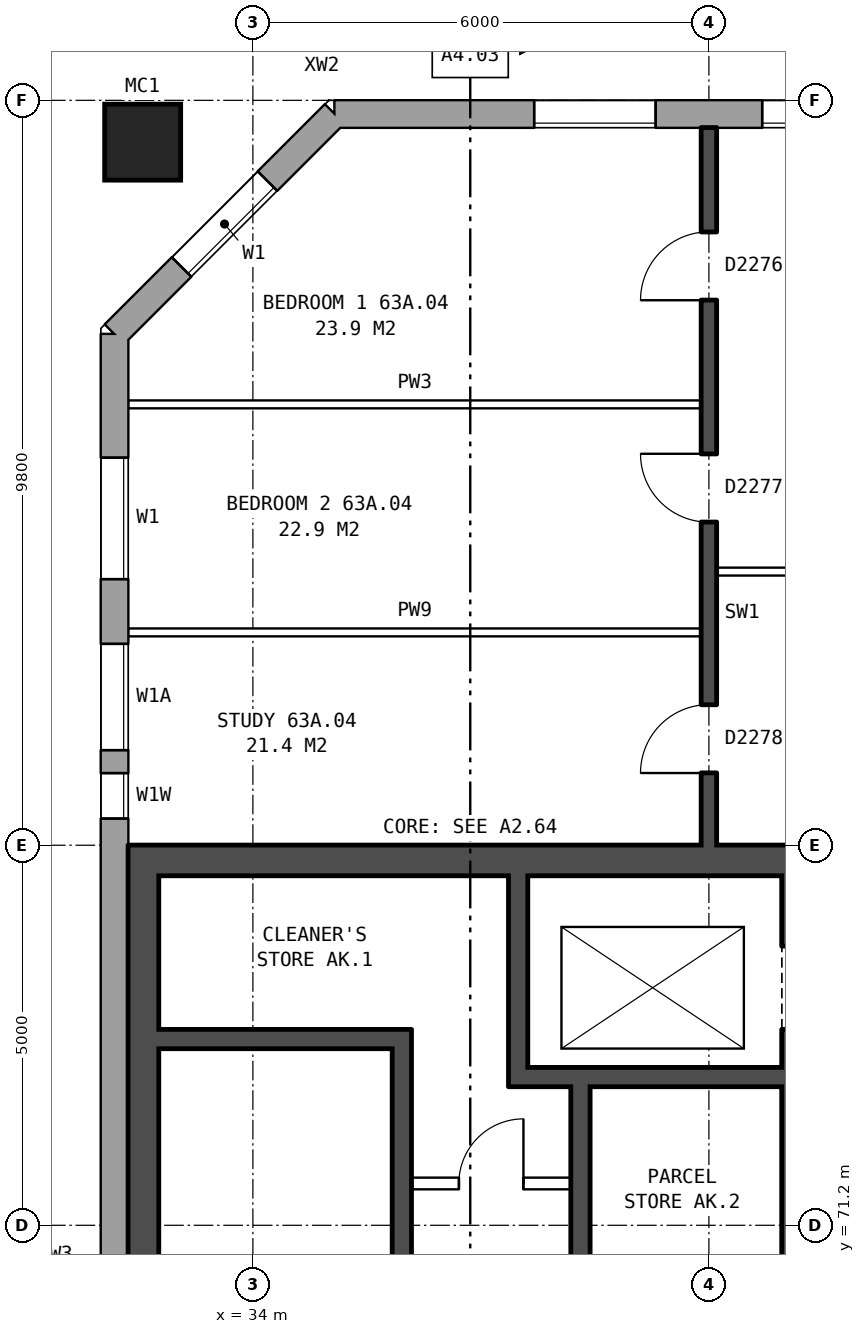
"""IFC4 building model, lengths in metres.
Left out: names, types, materials, properties, quantities, classifications, styles, units other than length and angle.
Written with IfcOpenShell. Run it as: python <this file> out.ifc"""

import sys

from ifc_helpers import new_model, si_unit, direction, frame, frame_2d, origin, origin_2d, place, context, subcontext, project, spatial, rectangle, hollow_rectangle, extrude, element, fill, save


model = new_model("IFC4")
c1 = context("Model", 3, precision=1e-05, world=origin(), true_north=direction((0.0, 1.0)))
c2 = subcontext(c1, "Body", "Model", "MODEL_VIEW")
j1 = project(units=[si_unit("LENGTHUNIT", "METRE"), si_unit("PLANEANGLEUNIT", "RADIAN")], contexts=[c1])
p1 = place(None, origin())
s1 = spatial("IfcSite", under=j1, at=p1, CompositionType="ELEMENT")
p2 = place(p1, origin())
s2 = spatial("IfcBuilding", under=s1, at=p2, CompositionType="ELEMENT")
p3 = place(p2, frame((0.0, 0.0, 224.5)))
s3 = spatial("IfcBuildingStorey", under=s2, at=p3, CompositionType="ELEMENT", Elevation=224.5)
p4 = place(p3, frame((32.55, 85.45, 0.0), z_axis=(0.0, 0.0, 1.0), x_axis=(1.0, 0.0, 0.0)))
e1 = element("IfcColumn", 1, at=p4, inside=s3, PredefinedType="COLUMN", context=c2, shape_type="SweptSolid", body=[
    extrude(hollow_rectangle(XDim=1.0, YDim=1.0, WallThickness=0.055, at=origin_2d()), origin(), (0.0, 0.0, 1.0), 3.1),
])
p5 = place(p3, frame((74.95, 85.82, 0.0), z_axis=(0.0, 0.0, 1.0), x_axis=(-1.0, 0.0, 0.0)))
e2 = element("IfcWall", 2, at=p5, inside=s3, PredefinedType="STANDARD", context=c2, shape_type="SweptSolid", body=[
    extrude(rectangle(XDim=39.875, YDim=0.36, at=frame_2d((19.938, 0.0))), origin(), (0.0, 0.0, 1.0), 2.85),
])
p6 = place(p5, frame((2.65, 0.0, 0.8)))
e3 = element("IfcOpeningElement", 3, at=p6, cuts=e2, PredefinedType="OPENING", context=c2, shape_type="SweptSolid", body=[
    extrude(rectangle(XDim=1.6, YDim=1.8, at=frame_2d((0.8, 0.9))), frame((0.0, 0.19, 0.0), z_axis=(0.0, -1.0, 0.0), x_axis=(1.0, 0.0, 0.0)), (0.0, 0.0, 1.0), 0.38),
])
p7 = place(p5, frame((5.65, 0.0, 0.8)))
e4 = element("IfcOpeningElement", 4, at=p7, cuts=e2, PredefinedType="OPENING", context=c2, shape_type="SweptSolid", body=[
    extrude(rectangle(XDim=1.6, YDim=1.8, at=frame_2d((0.8, 0.9))), frame((0.0, 0.19, 0.0), z_axis=(0.0, -1.0, 0.0), x_axis=(1.0, 0.0, 0.0)), (0.0, 0.0, 1.0), 0.38),
])
p8 = place(p5, frame((8.65, 0.0, 0.8)))
e5 = element("IfcOpeningElement", 5, at=p8, cuts=e2, PredefinedType="OPENING", context=c2, shape_type="SweptSolid", body=[
    extrude(rectangle(XDim=1.6, YDim=1.8, at=frame_2d((0.8, 0.9))), frame((0.0, 0.19, 0.0), z_axis=(0.0, -1.0, 0.0), x_axis=(1.0, 0.0, 0.0)), (0.0, 0.0, 1.0), 0.38),
])
p9 = place(p5, frame((11.65, 0.0, 0.8)))
e6 = element("IfcOpeningElement", 6, at=p9, cuts=e2, PredefinedType="OPENING", context=c2, shape_type="SweptSolid", body=[
    extrude(rectangle(XDim=1.6, YDim=1.8, at=frame_2d((0.8, 0.9))), frame((0.0, 0.19, 0.0), z_axis=(0.0, -1.0, 0.0), x_axis=(1.0, 0.0, 0.0)), (0.0, 0.0, 1.0), 0.38),
])
p10 = place(p5, frame((15.55, 0.0, 0.8)))
e7 = element("IfcOpeningElement", 7, at=p10, cuts=e2, PredefinedType="OPENING", context=c2, shape_type="SweptSolid", body=[
    extrude(rectangle(XDim=1.2, YDim=1.8, at=frame_2d((0.6, 0.9))), frame((0.0, 0.19, 0.0), z_axis=(0.0, -1.0, 0.0), x_axis=(1.0, 0.0, 0.0)), (0.0, 0.0, 1.0), 0.38),
])
p11 = place(p5, frame((17.65, 0.0, 0.8)))
e8 = element("IfcOpeningElement", 8, at=p11, cuts=e2, PredefinedType="OPENING", context=c2, shape_type="SweptSolid", body=[
    extrude(rectangle(XDim=1.6, YDim=1.8, at=frame_2d((0.8, 0.9))), frame((0.0, 0.19, 0.0), z_axis=(0.0, -1.0, 0.0), x_axis=(1.0, 0.0, 0.0)), (0.0, 0.0, 1.0), 0.38),
])
p12 = place(p5, frame((20.65, 0.0, 0.8)))
e9 = element("IfcOpeningElement", 9, at=p12, cuts=e2, PredefinedType="OPENING", context=c2, shape_type="SweptSolid", body=[
    extrude(rectangle(XDim=1.6, YDim=1.8, at=frame_2d((0.8, 0.9))), frame((0.0, 0.19, 0.0), z_axis=(0.0, -1.0, 0.0), x_axis=(1.0, 0.0, 0.0)), (0.0, 0.0, 1.0), 0.38),
])
p13 = place(p5, frame((23.65, 0.0, 0.8)))
e10 = element("IfcOpeningElement", 10, at=p13, cuts=e2, PredefinedType="OPENING", context=c2, shape_type="SweptSolid", body=[
    extrude(rectangle(XDim=1.6, YDim=1.8, at=frame_2d((0.8, 0.9))), frame((0.0, 0.19, 0.0), z_axis=(0.0, -1.0, 0.0), x_axis=(1.0, 0.0, 0.0)), (0.0, 0.0, 1.0), 0.38),
])
p14 = place(p5, frame((26.1, 0.0, 0.25)))
e11 = element("IfcOpeningElement", 11, at=p14, cuts=e2, PredefinedType="OPENING", context=c2, shape_type="SweptSolid", body=[
    extrude(rectangle(XDim=0.8, YDim=1.5, at=frame_2d((0.4, 0.75))), frame((0.0, 0.19, 0.0), z_axis=(0.0, -1.0, 0.0), x_axis=(1.0, 0.0, 0.0)), (0.0, 0.0, 1.0), 0.38),
])
p15 = place(p5, frame((29.65, 0.0, 0.8)))
e12 = element("IfcOpeningElement", 12, at=p15, cuts=e2, PredefinedType="OPENING", context=c2, shape_type="SweptSolid", body=[
    extrude(rectangle(XDim=1.6, YDim=1.8, at=frame_2d((0.8, 0.9))), frame((0.0, 0.19, 0.0), z_axis=(0.0, -1.0, 0.0), x_axis=(1.0, 0.0, 0.0)), (0.0, 0.0, 1.0), 0.38),
])
p16 = place(p5, frame((32.65, 0.0, 0.8)))
e13 = element("IfcOpeningElement", 13, at=p16, cuts=e2, PredefinedType="OPENING", context=c2, shape_type="SweptSolid", body=[
    extrude(rectangle(XDim=1.6, YDim=1.8, at=frame_2d((0.8, 0.9))), frame((0.0, 0.19, 0.0), z_axis=(0.0, -1.0, 0.0), x_axis=(1.0, 0.0, 0.0)), (0.0, 0.0, 1.0), 0.38),
])
p17 = place(p5, frame((35.65, 0.0, 0.8)))
e14 = element("IfcOpeningElement", 14, at=p17, cuts=e2, PredefinedType="OPENING", context=c2, shape_type="SweptSolid", body=[
    extrude(rectangle(XDim=1.6, YDim=1.8, at=frame_2d((0.8, 0.9))), frame((0.0, 0.19, 0.0), z_axis=(0.0, -1.0, 0.0), x_axis=(1.0, 0.0, 0.0)), (0.0, 0.0, 1.0), 0.38),
])
p18 = place(p5, frame((28.15, 0.0, 1.65)))
e15 = element("IfcOpeningElement", 15, at=p18, cuts=e2, PredefinedType="OPENING", context=c2, shape_type="SweptSolid", body=[
    extrude(rectangle(XDim=0.6, YDim=0.9, at=frame_2d((0.3, 0.45))), frame((0.0, 0.19, 0.0), z_axis=(0.0, -1.0, 0.0), x_axis=(1.0, 0.0, 0.0)), (0.0, 0.0, 1.0), 0.38),
])
p19 = place(p3, frame((35.075, 85.82, 0.0), z_axis=(0.0, 0.0, 1.0), x_axis=(-0.707106781187, -0.707106781187, 0.0)))
e16 = element("IfcWall", 16, at=p19, inside=s3, PredefinedType="STANDARD", context=c2, shape_type="SweptSolid", body=[
    extrude(rectangle(XDim=4.094, YDim=0.36, at=frame_2d((2.047, 0.0))), origin(), (0.0, 0.0, 1.0), 2.85),
])
p20 = place(p19, frame((1.247, 0.0, 0.8)))
e17 = element("IfcOpeningElement", 17, at=p20, cuts=e16, PredefinedType="OPENING", context=c2, shape_type="SweptSolid", body=[
    extrude(rectangle(XDim=1.6, YDim=1.8, at=frame_2d((0.8, 0.9))), frame((0.0, 0.19, 0.0), z_axis=(0.0, -1.0, 0.0), x_axis=(1.0, 0.0, 0.0)), (0.0, 0.0, 1.0), 0.38),
])
p21 = place(p3, frame((32.18, 82.925, 0.0), z_axis=(0.0, 0.0, 1.0), x_axis=(0.0, -1.0, 0.0)))
e18 = element("IfcWall", 18, at=p21, inside=s3, PredefinedType="STANDARD", context=c2, shape_type="SweptSolid", body=[
    extrude(rectangle(XDim=25.851, YDim=0.36, at=frame_2d((12.925, 0.0))), origin(), (0.0, 0.0, 1.0), 2.85),
])
p22 = place(p21, frame((1.625, 0.0, 0.8)))
e19 = element("IfcOpeningElement", 19, at=p22, cuts=e18, PredefinedType="OPENING", context=c2, shape_type="SweptSolid", body=[
    extrude(rectangle(XDim=1.6, YDim=1.8, at=frame_2d((0.8, 0.9))), frame((0.0, 0.19, 0.0), z_axis=(0.0, -1.0, 0.0), x_axis=(1.0, 0.0, 0.0)), (0.0, 0.0, 1.0), 0.38),
])
p23 = place(p21, frame((4.075, 0.0, 0.8)))
e20 = element("IfcOpeningElement", 20, at=p23, cuts=e18, PredefinedType="OPENING", context=c2, shape_type="SweptSolid", body=[
    extrude(rectangle(XDim=1.4, YDim=1.8, at=frame_2d((0.7, 0.9))), frame((0.0, 0.19, 0.0), z_axis=(0.0, -1.0, 0.0), x_axis=(1.0, 0.0, 0.0)), (0.0, 0.0, 1.0), 0.38),
])
p24 = place(p21, frame((19.425, 0.0, 0.8)))
e21 = element("IfcOpeningElement", 21, at=p24, cuts=e18, PredefinedType="OPENING", context=c2, shape_type="SweptSolid", body=[
    extrude(rectangle(XDim=0.6, YDim=0.9, at=frame_2d((0.3, 0.45))), frame((0.0, 0.19, 0.0), z_axis=(0.0, -1.0, 0.0), x_axis=(1.0, 0.0, 0.0)), (0.0, 0.0, 1.0), 0.38),
])
p25 = place(p21, frame((22.625, 0.0, 0.8)))
e22 = element("IfcOpeningElement", 22, at=p25, cuts=e18, PredefinedType="OPENING", context=c2, shape_type="SweptSolid", body=[
    extrude(rectangle(XDim=1.6, YDim=1.8, at=frame_2d((0.8, 0.9))), frame((0.0, 0.19, 0.0), z_axis=(0.0, -1.0, 0.0), x_axis=(1.0, 0.0, 0.0)), (0.0, 0.0, 1.0), 0.38),
])
p26 = place(p21, frame((5.775, 0.0, 0.8)))
e23 = element("IfcOpeningElement", 23, at=p26, cuts=e18, PredefinedType="OPENING", context=c2, shape_type="SweptSolid", body=[
    extrude(rectangle(XDim=0.6, YDim=0.9, at=frame_2d((0.3, 0.45))), frame((0.0, 0.19, 0.0), z_axis=(0.0, -1.0, 0.0), x_axis=(1.0, 0.0, 0.0)), (0.0, 0.0, 1.0), 0.38),
])
p27 = place(p21, frame((20.325, 0.0, 0.8)))
e24 = element("IfcOpeningElement", 24, at=p27, cuts=e18, PredefinedType="OPENING", context=c2, shape_type="SweptSolid", body=[
    extrude(rectangle(XDim=1.4, YDim=1.8, at=frame_2d((0.7, 0.9))), frame((0.0, 0.19, 0.0), z_axis=(0.0, -1.0, 0.0), x_axis=(1.0, 0.0, 0.0)), (0.0, 0.0, 1.0), 0.38),
])
p28 = place(p3, frame((41.16, 76.2, 0.0), z_axis=(0.0, 0.0, 1.0), x_axis=(0.0, -1.0, 0.0)))
e25 = element("IfcWall", 25, at=p28, inside=s3, PredefinedType="SHEAR", context=c2, shape_type="SweptSolid", body=[
    extrude(rectangle(XDim=12.4, YDim=0.4, at=frame_2d((6.2, 0.0))), origin(), (0.0, 0.0, 1.0), 2.85),
])
p29 = place(p28, frame((1.325, 0.0, 0.0)))
e26 = element("IfcOpeningElement", 26, at=p29, cuts=e25, PredefinedType="OPENING", context=c2, shape_type="SweptSolid", body=[
    extrude(rectangle(XDim=1.1, YDim=2.1, at=frame_2d((0.55, 1.05))), frame((0.0, 0.21, 0.0), z_axis=(0.0, -1.0, 0.0), x_axis=(1.0, 0.0, 0.0)), (0.0, 0.0, 1.0), 0.42),
])
p30 = place(p28, frame((5.925, 0.0, 0.0)))
e27 = element("IfcOpeningElement", 27, at=p30, cuts=e25, PredefinedType="OPENING", context=c2, shape_type="SweptSolid", body=[
    extrude(rectangle(XDim=0.85, YDim=2.1, at=frame_2d((0.425, 1.05))), frame((0.0, 0.21, 0.0), z_axis=(0.0, -1.0, 0.0), x_axis=(1.0, 0.0, 0.0)), (0.0, 0.0, 1.0), 0.42),
])
p31 = place(p28, frame((9.9, 0.0, 0.0)))
e28 = element("IfcOpeningElement", 28, at=p31, cuts=e25, PredefinedType="OPENING", context=c2, shape_type="SweptSolid", body=[
    extrude(rectangle(XDim=1.1, YDim=2.1, at=frame_2d((0.55, 1.05))), frame((0.0, 0.21, 0.0), z_axis=(0.0, -1.0, 0.0), x_axis=(1.0, 0.0, 0.0)), (0.0, 0.0, 1.0), 0.42),
])
p32 = place(p3, frame((32.56, 76.2, 0.0), z_axis=(0.0, 0.0, 1.0), x_axis=(0.0, -1.0, 0.0)))
e29 = element("IfcWall", 29, at=p32, inside=s3, PredefinedType="SHEAR", context=c2, shape_type="SweptSolid", body=[
    extrude(rectangle(XDim=12.4, YDim=0.4, at=frame_2d((6.2, 0.0))), origin(), (0.0, 0.0, 1.0), 2.85),
])
p33 = place(p3, frame((40.96, 76.0, 0.0), z_axis=(0.0, 0.0, 1.0), x_axis=(-1.0, 0.0, 0.0)))
e30 = element("IfcWall", 30, at=p33, inside=s3, PredefinedType="SHEAR", context=c2, shape_type="SweptSolid", body=[
    extrude(rectangle(XDim=8.2, YDim=0.4, at=frame_2d((4.1, 0.0))), origin(), (0.0, 0.0, 1.0), 2.85),
])
p34 = place(p3, frame((35.835, 73.65, 0.0), z_axis=(0.0, 0.0, 1.0), x_axis=(-1.0, 0.0, 0.0)))
e31 = element("IfcWall", 31, at=p34, inside=s3, PredefinedType="SHEAR", context=c2, shape_type="SweptSolid", body=[
    extrude(rectangle(XDim=3.075, YDim=0.25, at=frame_2d((1.538, 0.0))), origin(), (0.0, 0.0, 1.0), 2.85),
])
p35 = place(p3, frame((40.96, 73.15, 0.0), z_axis=(0.0, 0.0, 1.0), x_axis=(-1.0, 0.0, 0.0)))
e32 = element("IfcWall", 32, at=p35, inside=s3, PredefinedType="SHEAR", context=c2, shape_type="SweptSolid", body=[
    extrude(rectangle(XDim=3.595, YDim=0.25, at=frame_2d((1.797, 0.0))), origin(), (0.0, 0.0, 1.0), 2.85),
])
p36 = place(p3, frame((38.185, 71.75, 0.0), z_axis=(0.0, 0.0, 1.0), x_axis=(-1.0, 0.0, 0.0)))
e33 = element("IfcWall", 33, at=p36, inside=s3, PredefinedType="PARTITIONING", context=c2, shape_type="SweptSolid", body=[
    extrude(rectangle(XDim=2.1, YDim=0.15, at=frame_2d((1.05, 0.0))), origin(), (0.0, 0.0, 1.0), 2.85),
])
p37 = place(p36, frame((0.625, 0.0, 0.0)))
e34 = element("IfcOpeningElement", 34, at=p37, cuts=e33, PredefinedType="OPENING", context=c2, shape_type="SweptSolid", body=[
    extrude(rectangle(XDim=0.85, YDim=2.1, at=frame_2d((0.425, 1.05))), frame((0.0, 0.085, 0.0), z_axis=(0.0, -1.0, 0.0), x_axis=(1.0, 0.0, 0.0)), (0.0, 0.0, 1.0), 0.17),
])
p38 = place(p3, frame((38.31, 73.025, 0.0), z_axis=(0.0, 0.0, 1.0), x_axis=(0.0, -1.0, 0.0)))
e35 = element("IfcWall", 35, at=p38, inside=s3, PredefinedType="SHEAR", context=c2, shape_type="SweptSolid", body=[
    extrude(rectangle(XDim=6.6, YDim=0.25, at=frame_2d((3.3, 0.0))), origin(), (0.0, 0.0, 1.0), 2.85),
])
p39 = place(p3, frame((37.49, 75.8, 0.0), z_axis=(0.0, 0.0, 1.0), x_axis=(0.0, -1.0, 0.0)))
e36 = element("IfcWall", 36, at=p39, inside=s3, PredefinedType="SHEAR", context=c2, shape_type="SweptSolid", body=[
    extrude(rectangle(XDim=2.525, YDim=0.25, at=frame_2d((1.263, 0.0))), origin(), (0.0, 0.0, 1.0), 2.85),
])
p40 = place(p3, frame((35.96, 73.775, 0.0), z_axis=(0.0, 0.0, 1.0), x_axis=(0.0, -1.0, 0.0)))
e37 = element("IfcWall", 37, at=p40, inside=s3, PredefinedType="SHEAR", context=c2, shape_type="SweptSolid", body=[
    extrude(rectangle(XDim=7.35, YDim=0.25, at=frame_2d((3.675, 0.0))), origin(), (0.0, 0.0, 1.0), 2.85),
])
p41 = place(p3, frame((32.36, 79.0, 0.0), z_axis=(0.0, 0.0, 1.0), x_axis=(1.0, 0.0, 0.0)))
e38 = element("IfcWall", 38, at=p41, inside=s3, PredefinedType="PARTITIONING", context=c2, shape_type="SweptSolid", body=[
    extrude(rectangle(XDim=7.54, YDim=0.1, at=frame_2d((3.77, 0.0))), origin(), (0.0, 0.0, 1.0), 2.85),
])
p42 = place(p3, frame((40.1, 79.8, 0.0), z_axis=(0.0, 0.0, 1.0), x_axis=(1.0, 0.0, 0.0)))
e39 = element("IfcWall", 39, at=p42, inside=s3, PredefinedType="PARTITIONING", context=c2, shape_type="SweptSolid", body=[
    extrude(rectangle(XDim=5.8, YDim=0.1, at=frame_2d((2.9, 0.0))), origin(), (0.0, 0.0, 1.0), 2.85),
])
p43 = place(p42, frame((1.3, 0.0, 0.0)))
e40 = element("IfcOpeningElement", 40, at=p43, cuts=e39, PredefinedType="OPENING", context=c2, shape_type="SweptSolid", body=[
    extrude(rectangle(XDim=0.9, YDim=2.1, at=frame_2d((0.45, 1.05))), frame((0.0, 0.06, 0.0), z_axis=(0.0, -1.0, 0.0), x_axis=(1.0, 0.0, 0.0)), (0.0, 0.0, 1.0), 0.12),
])
p44 = place(p42, frame((4.2, 0.0, 0.0)))
e41 = element("IfcOpeningElement", 41, at=p44, cuts=e39, PredefinedType="OPENING", context=c2, shape_type="SweptSolid", body=[
    extrude(rectangle(XDim=0.9, YDim=2.1, at=frame_2d((0.45, 1.05))), frame((0.0, 0.06, 0.0), z_axis=(0.0, -1.0, 0.0), x_axis=(1.0, 0.0, 0.0)), (0.0, 0.0, 1.0), 0.12),
])
p45 = place(p3, frame((32.36, 82.0, 0.0), z_axis=(0.0, 0.0, 1.0), x_axis=(1.0, 0.0, 0.0)))
e42 = element("IfcWall", 42, at=p45, inside=s3, PredefinedType="PARTITIONING", context=c2, shape_type="SweptSolid", body=[
    extrude(rectangle(XDim=7.54, YDim=0.1, at=frame_2d((3.77, 0.0))), origin(), (0.0, 0.0, 1.0), 2.85),
])
p46 = place(p3, frame((40.0, 76.2, 0.0), z_axis=(0.0, 0.0, 1.0), x_axis=(0.0, 1.0, 0.0)))
e43 = element("IfcWall", 43, at=p46, inside=s3, PredefinedType="SOLIDWALL", context=c2, shape_type="SweptSolid", body=[
    extrude(rectangle(XDim=9.44, YDim=0.2, at=frame_2d((4.72, 0.0))), origin(), (0.0, 0.0, 1.0), 2.85),
])
p47 = place(p46, frame((7.17, 0.0, 0.0)))
e44 = element("IfcOpeningElement", 44, at=p47, cuts=e43, PredefinedType="OPENING", context=c2, shape_type="SweptSolid", body=[
    extrude(rectangle(XDim=0.9, YDim=2.1, at=frame_2d((0.45, 1.05))), frame((0.0, 0.11, 0.0), z_axis=(0.0, -1.0, 0.0), x_axis=(1.0, 0.0, 0.0)), (0.0, 0.0, 1.0), 0.22),
])
p48 = place(p46, frame((4.25, 0.0, 0.0)))
e45 = element("IfcOpeningElement", 45, at=p48, cuts=e43, PredefinedType="OPENING", context=c2, shape_type="SweptSolid", body=[
    extrude(rectangle(XDim=0.9, YDim=2.1, at=frame_2d((0.45, 1.05))), frame((0.0, 0.11, 0.0), z_axis=(0.0, -1.0, 0.0), x_axis=(1.0, 0.0, 0.0)), (0.0, 0.0, 1.0), 0.22),
])
p49 = place(p46, frame((0.95, 0.0, 0.0)))
e46 = element("IfcOpeningElement", 46, at=p49, cuts=e43, PredefinedType="OPENING", context=c2, shape_type="SweptSolid", body=[
    extrude(rectangle(XDim=0.9, YDim=2.1, at=frame_2d((0.45, 1.05))), frame((0.0, 0.11, 0.0), z_axis=(0.0, -1.0, 0.0), x_axis=(1.0, 0.0, 0.0)), (0.0, 0.0, 1.0), 0.22),
])
p50 = place(p16, origin())
e47 = element("IfcWindow", 47, at=p50, inside=s3, PartitioningType="SINGLE_PANEL", PredefinedType="WINDOW", context=c2, shape_type="SweptSolid", body=[
    extrude(rectangle(XDim=1.6, YDim=1.8, at=frame_2d((0.8, 0.9))), frame((0.0, 0.15, 0.0), z_axis=(0.0, -1.0, 0.0), x_axis=(1.0, 0.0, 0.0)), (0.0, 0.0, 1.0), 0.06),
])
fill(e13, e47)
p51 = place(p17, origin())
e48 = element("IfcWindow", 48, at=p51, inside=s3, PartitioningType="SINGLE_PANEL", PredefinedType="WINDOW", context=c2, shape_type="SweptSolid", body=[
    extrude(rectangle(XDim=1.6, YDim=1.8, at=frame_2d((0.8, 0.9))), frame((0.0, 0.15, 0.0), z_axis=(0.0, -1.0, 0.0), x_axis=(1.0, 0.0, 0.0)), (0.0, 0.0, 1.0), 0.06),
])
fill(e14, e48)
p52 = place(p20, origin())
e49 = element("IfcWindow", 49, at=p52, inside=s3, PartitioningType="SINGLE_PANEL", PredefinedType="WINDOW", context=c2, shape_type="SweptSolid", body=[
    extrude(rectangle(XDim=1.6, YDim=1.8, at=frame_2d((0.8, 0.9))), frame((0.0, 0.15, 0.0), z_axis=(0.0, -1.0, 0.0), x_axis=(1.0, 0.0, 0.0)), (0.0, 0.0, 1.0), 0.06),
])
fill(e17, e49)
p53 = place(p22, origin())
e50 = element("IfcWindow", 50, at=p53, inside=s3, PartitioningType="SINGLE_PANEL", PredefinedType="WINDOW", context=c2, shape_type="SweptSolid", body=[
    extrude(rectangle(XDim=1.6, YDim=1.8, at=frame_2d((0.8, 0.9))), frame((0.0, 0.15, 0.0), z_axis=(0.0, -1.0, 0.0), x_axis=(1.0, 0.0, 0.0)), (0.0, 0.0, 1.0), 0.06),
])
fill(e19, e50)
p54 = place(p23, origin())
e51 = element("IfcWindow", 51, at=p54, inside=s3, PartitioningType="SINGLE_PANEL", PredefinedType="WINDOW", context=c2, shape_type="SweptSolid", body=[
    extrude(rectangle(XDim=1.4, YDim=1.8, at=frame_2d((0.7, 0.9))), frame((0.0, 0.15, 0.0), z_axis=(0.0, -1.0, 0.0), x_axis=(1.0, 0.0, 0.0)), (0.0, 0.0, 1.0), 0.06),
])
fill(e20, e51)
p55 = place(p29, origin())
e52 = element("IfcDoor", 52, at=p55, inside=s3, OperationType="DOUBLE_DOOR_SLIDING", PredefinedType="DOOR", context=c2, shape_type="SweptSolid", body=[
    extrude(rectangle(XDim=1.1, YDim=2.1, at=frame_2d((0.55, 1.05))), frame((0.0, -0.135, 0.0), z_axis=(0.0, -1.0, 0.0), x_axis=(1.0, 0.0, 0.0)), (0.0, 0.0, 1.0), 0.05),
])
fill(e26, e52)
p56 = place(p37, frame((0.85, 0.0, 0.0), z_axis=(0.0, 0.0, 1.0), x_axis=(-1.0, 0.0, 0.0)))
e53 = element("IfcDoor", 53, at=p56, inside=s3, OperationType="SINGLE_SWING_RIGHT", PredefinedType="DOOR", context=c2, shape_type="SweptSolid", body=[
    extrude(rectangle(XDim=0.85, YDim=2.1, at=frame_2d((0.425, 1.05))), frame((0.0, 0.025, 0.0), z_axis=(0.0, -1.0, 0.0), x_axis=(1.0, 0.0, 0.0)), (0.0, 0.0, 1.0), 0.05),
])
fill(e34, e53)
p57 = place(p47, origin())
e54 = element("IfcDoor", 54, at=p57, inside=s3, OperationType="SINGLE_SWING_LEFT", PredefinedType="DOOR", context=c2, shape_type="SweptSolid", body=[
    extrude(rectangle(XDim=0.9, YDim=2.1, at=frame_2d((0.45, 1.05))), frame((0.0, 0.025, 0.0), z_axis=(0.0, -1.0, 0.0), x_axis=(1.0, 0.0, 0.0)), (0.0, 0.0, 1.0), 0.05),
])
fill(e44, e54)
p58 = place(p48, origin())
e55 = element("IfcDoor", 55, at=p58, inside=s3, OperationType="SINGLE_SWING_RIGHT", PredefinedType="DOOR", context=c2, shape_type="SweptSolid", body=[
    extrude(rectangle(XDim=0.9, YDim=2.1, at=frame_2d((0.45, 1.05))), frame((0.0, 0.025, 0.0), z_axis=(0.0, -1.0, 0.0), x_axis=(1.0, 0.0, 0.0)), (0.0, 0.0, 1.0), 0.05),
])
fill(e45, e55)
p59 = place(p49, origin())
e56 = element("IfcDoor", 56, at=p59, inside=s3, OperationType="SINGLE_SWING_LEFT", PredefinedType="DOOR", context=c2, shape_type="SweptSolid", body=[
    extrude(rectangle(XDim=0.9, YDim=2.1, at=frame_2d((0.45, 1.05))), frame((0.0, 0.025, 0.0), z_axis=(0.0, -1.0, 0.0), x_axis=(1.0, 0.0, 0.0)), (0.0, 0.0, 1.0), 0.05),
])
fill(e46, e56)
p60 = place(p26, origin())
e57 = element("IfcWindow", 57, at=p60, inside=s3, PartitioningType="SINGLE_PANEL", PredefinedType="WINDOW", context=c2, shape_type="SweptSolid", body=[
    extrude(rectangle(XDim=0.6, YDim=0.9, at=frame_2d((0.3, 0.45))), frame((0.0, 0.15, 0.0), z_axis=(0.0, -1.0, 0.0), x_axis=(1.0, 0.0, 0.0)), (0.0, 0.0, 1.0), 0.06),
])
fill(e23, e57)
save(model, sys.argv[1])
